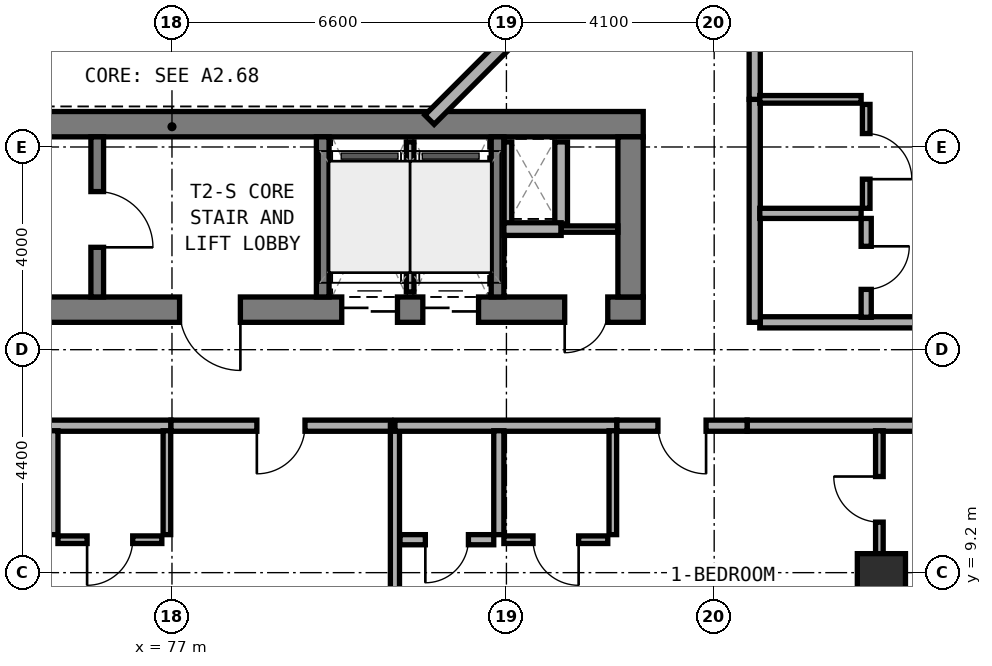
"""IFC4 building model, lengths in metres.
Left out: names, types, materials, properties, quantities, classifications, styles, units other than length and angle.
Written with IfcOpenShell. Run it as: python <this file> out.ifc"""

import sys

from ifc_helpers import new_model, si_unit, direction, frame, frame_2d, origin, origin_2d, place, context, subcontext, project, spatial, rectangle, extrude, element, fill, save


model = new_model("IFC4")
c1 = context("Model", 3, precision=1e-05, world=origin(), true_north=direction((0.0, 1.0)))
c2 = subcontext(c1, "Body", "Model", "MODEL_VIEW")
j1 = project(units=[si_unit("LENGTHUNIT", "METRE"), si_unit("PLANEANGLEUNIT", "RADIAN")], contexts=[c1])
p1 = place(None, origin())
s1 = spatial("IfcSite", under=j1, at=p1, CompositionType="ELEMENT")
p2 = place(p1, origin())
s2 = spatial("IfcBuilding", under=s1, at=p2, CompositionType="ELEMENT")
p3 = place(p2, frame((0.0, 0.0, 59.0)))
s3 = spatial("IfcBuildingStorey", under=s2, at=p3, CompositionType="ELEMENT", Elevation=59.0)
p4 = place(p3, frame((67.9, 14.39, 0.0), z_axis=(0.0, 0.0, 1.0), x_axis=(1.0, 0.0, 0.0)))
e1 = element("IfcWall", 1, at=p4, inside=s3, PredefinedType="SHEAR", context=c2, shape_type="SweptSolid", body=[
    extrude(rectangle(XDim=18.4, YDim=0.5, at=frame_2d((9.2, 0.0))), origin(), (0.0, 0.0, 1.0), 3.5),
])
p5 = place(p4, frame((9.25, 0.0, 0.0)))
e2 = element("IfcOpeningElement", 2, at=p5, cuts=e1, PredefinedType="OPENING", context=c2, shape_type="SweptSolid", body=[
    extrude(rectangle(XDim=1.2, YDim=2.15, at=frame_2d((0.6, 1.075))), frame((0.0, 0.26, 0.0), z_axis=(0.0, -1.0, 0.0), x_axis=(1.0, 0.0, 0.0)), (0.0, 0.0, 1.0), 0.52),
])
p6 = place(p4, frame((16.85, 0.0, 0.0)))
e3 = element("IfcOpeningElement", 3, at=p6, cuts=e1, PredefinedType="OPENING", context=c2, shape_type="SweptSolid", body=[
    extrude(rectangle(XDim=0.85, YDim=2.1, at=frame_2d((0.425, 1.05))), frame((0.0, 0.26, 0.0), z_axis=(0.0, -1.0, 0.0), x_axis=(1.0, 0.0, 0.0)), (0.0, 0.0, 1.0), 0.52),
])
p7 = place(p4, frame((12.45, 0.0, 0.0)))
e4 = element("IfcOpeningElement", 4, at=p7, cuts=e1, PredefinedType="OPENING", context=c2, shape_type="SweptSolid", body=[
    extrude(rectangle(XDim=1.1, YDim=2.15, at=frame_2d((0.55, 1.075))), frame((0.0, 0.26, 0.0), z_axis=(0.0, -1.0, 0.0), x_axis=(1.0, 0.0, 0.0)), (0.0, 0.0, 1.0), 0.52),
])
p8 = place(p4, frame((14.05, 0.0, 0.0)))
e5 = element("IfcOpeningElement", 5, at=p8, cuts=e1, PredefinedType="OPENING", context=c2, shape_type="SweptSolid", body=[
    extrude(rectangle(XDim=1.1, YDim=2.15, at=frame_2d((0.55, 1.075))), frame((0.0, 0.26, 0.0), z_axis=(0.0, -1.0, 0.0), x_axis=(1.0, 0.0, 0.0)), (0.0, 0.0, 1.0), 0.52),
])
p9 = place(p3, frame((67.9, 18.05, 0.0), z_axis=(0.0, 0.0, 1.0), x_axis=(1.0, 0.0, 0.0)))
e6 = element("IfcWall", 6, at=p9, inside=s3, PredefinedType="SHEAR", context=c2, shape_type="SweptSolid", body=[
    extrude(rectangle(XDim=18.4, YDim=0.5, at=frame_2d((9.2, 0.0))), origin(), (0.0, 0.0, 1.0), 3.5),
])
p10 = place(p3, frame((86.05, 14.64, 0.0), z_axis=(0.0, 0.0, 1.0), x_axis=(0.0, 1.0, 0.0)))
e7 = element("IfcWall", 7, at=p10, inside=s3, PredefinedType="SHEAR", context=c2, shape_type="SweptSolid", body=[
    extrude(rectangle(XDim=3.16, YDim=0.5, at=frame_2d((1.58, 0.0))), origin(), (0.0, 0.0, 1.0), 3.5),
])
p11 = place(p3, frame((75.525, 14.64, 0.0), z_axis=(0.0, 0.0, 1.0), x_axis=(0.0, 1.0, 0.0)))
e8 = element("IfcWall", 8, at=p11, inside=s3, PredefinedType="STANDARD", context=c2, shape_type="SweptSolid", body=[
    extrude(rectangle(XDim=3.16, YDim=0.25, at=frame_2d((1.58, 0.0))), origin(), (0.0, 0.0, 1.0), 3.25),
])
p12 = place(p11, frame((0.98, 0.0, 0.0)))
e9 = element("IfcOpeningElement", 9, at=p12, cuts=e8, PredefinedType="OPENING", context=c2, shape_type="SweptSolid", body=[
    extrude(rectangle(XDim=1.1, YDim=2.15, at=frame_2d((0.55, 1.075))), frame((0.0, 0.135, 0.0), z_axis=(0.0, -1.0, 0.0), x_axis=(1.0, 0.0, 0.0)), (0.0, 0.0, 1.0), 0.27),
])
for number, where, z_axis, x_axis in (
    (10, (79.975, 14.64, 0.0), (0.0, 0.0, 1.0), (0.0, 1.0, 0.0)),
    (11, (83.425, 14.64, 0.0), (0.0, 0.0, 1.0), (0.0, 1.0, 0.0)),
):
    element("IfcWall", number, at=place(p3, frame(where, z_axis=z_axis, x_axis=x_axis)), inside=s3, PredefinedType="STANDARD", context=c2, shape_type="SweptSolid", body=[
        extrude(rectangle(XDim=3.16, YDim=0.25, at=frame_2d((1.58, 0.0))), origin(), (0.0, 0.0, 1.0), 3.25),
    ])
p13 = place(p3, frame((91.0, 9.0, 0.0), z_axis=(0.0, 0.0, 1.0), x_axis=(1.0, 0.0, 0.0)))
e12 = element("IfcColumn", 12, at=p13, inside=s3, PredefinedType="COLUMN", context=c2, shape_type="SweptSolid", body=[
    extrude(rectangle(XDim=0.95, YDim=1.15, at=origin_2d()), origin(), (0.0, 0.0, 1.0), 3.5),
])
p14 = place(p3, frame((82.082, 18.138, 0.0), z_axis=(0.0, 0.0, 1.0), x_axis=(0.707106781187, 0.707106781187, 0.0)))
e13 = element("IfcWall", 13, at=p14, inside=s3, PredefinedType="STANDARD", context=c2, shape_type="SweptSolid", body=[
    extrude(rectangle(XDim=2.311, YDim=0.26, at=frame_2d((1.155, 0.0))), origin(), (0.0, 0.0, 1.0), 3.25),
])
p15 = place(p3, frame((83.63, 16.08, 0.0), z_axis=(0.0, 0.0, 1.0), x_axis=(0.0, 1.0, 0.0)))
e14 = element("IfcWall", 14, at=p15, inside=s3, PredefinedType="PARTITIONING", context=c2, shape_type="SweptSolid", body=[
    extrude(rectangle(XDim=1.62, YDim=0.15, at=frame_2d((0.81, 0.0))), origin(), (0.0, 0.0, 1.0), 2.725),
])
p16 = place(p3, frame((84.68, 16.08, 0.0), z_axis=(0.0, 0.0, 1.0), x_axis=(0.0, 1.0, 0.0)))
e15 = element("IfcWall", 15, at=p16, inside=s3, PredefinedType="SOLIDWALL", context=c2, shape_type="SweptSolid", body=[
    extrude(rectangle(XDim=1.62, YDim=0.25, at=frame_2d((0.81, 0.0))), origin(), (0.0, 0.0, 1.0), 3.22),
])
p17 = place(p3, frame((83.55, 15.98, 0.0), z_axis=(0.0, 0.0, 1.0), x_axis=(1.0, 0.0, 0.0)))
e16 = element("IfcWall", 16, at=p17, inside=s3, PredefinedType="SOLIDWALL", context=c2, shape_type="SweptSolid", body=[
    extrude(rectangle(XDim=1.13, YDim=0.25, at=frame_2d((0.565, 0.0))), origin(), (0.0, 0.0, 1.0), 3.22),
])
p18 = place(p3, frame((84.68, 15.98, 0.0), z_axis=(0.0, 0.0, 1.0), x_axis=(1.0, 0.0, 0.0)))
e17 = element("IfcWall", 17, at=p18, inside=s3, PredefinedType="PARTITIONING", context=c2, shape_type="SweptSolid", body=[
    extrude(rectangle(XDim=1.12, YDim=0.125, at=frame_2d((0.56, 0.0))), origin(), (0.0, 0.0, 1.0), 3.22),
])
p19 = place(p3, frame((81.7, 14.74, 0.0), z_axis=(0.0, 0.0, 1.0), x_axis=(0.0, 1.0, 0.0)))
e18 = element("IfcWall", 18, at=p19, inside=s3, PredefinedType="PARTITIONING", context=c2, shape_type="SweptSolid", body=[
    extrude(rectangle(XDim=2.96, YDim=0.15, at=frame_2d((1.48, 0.0))), origin(), (0.0, 0.0, 1.0), 3.22),
])
p20 = place(p3, frame((72.6, 12.1, 0.0), z_axis=(0.0, 0.0, 1.0), x_axis=(1.0, 0.0, 0.0)))
e19 = element("IfcWall", 19, at=p20, inside=s3, PredefinedType="SOLIDWALL", context=c2, shape_type="SweptSolid", body=[
    extrude(rectangle(XDim=4.38, YDim=0.22, at=frame_2d((2.19, 0.0))), origin(), (0.0, 0.0, 1.0), 2.725),
])
p21 = place(p3, frame((76.98, 12.1, 0.0), z_axis=(0.0, 0.0, 1.0), x_axis=(1.0, 0.0, 0.0)))
e20 = element("IfcWall", 20, at=p21, inside=s3, PredefinedType="SOLIDWALL", context=c2, shape_type="SweptSolid", body=[
    extrude(rectangle(XDim=4.34, YDim=0.22, at=frame_2d((2.17, 0.0))), origin(), (0.0, 0.0, 1.0), 2.725),
])
p22 = place(p21, frame((1.695, 0.0, 0.0)))
e21 = element("IfcOpeningElement", 21, at=p22, cuts=e20, PredefinedType="OPENING", context=c2, shape_type="SweptSolid", body=[
    extrude(rectangle(XDim=0.95, YDim=2.1, at=frame_2d((0.475, 1.05))), frame((0.0, 0.12, 0.0), z_axis=(0.0, -1.0, 0.0), x_axis=(1.0, 0.0, 0.0)), (0.0, 0.0, 1.0), 0.24),
])
p23 = place(p3, frame((74.65, 9.95, 0.0), z_axis=(0.0, 0.0, 1.0), x_axis=(0.0, 1.0, 0.0)))
e22 = element("IfcWall", 22, at=p23, inside=s3, PredefinedType="PLUMBINGWALL", context=c2, shape_type="SweptSolid", body=[
    extrude(rectangle(XDim=2.05, YDim=0.2, at=frame_2d((1.025, 0.0))), origin(), (0.0, 0.0, 1.0), 2.865),
])
p24 = place(p3, frame((76.9, 9.95, 0.0), z_axis=(0.0, 0.0, 1.0), x_axis=(0.0, 1.0, 0.0)))
e23 = element("IfcWall", 23, at=p24, inside=s3, PredefinedType="PARTITIONING", context=c2, shape_type="SweptSolid", body=[
    extrude(rectangle(XDim=2.05, YDim=0.15, at=frame_2d((1.025, 0.0))), origin(), (0.0, 0.0, 1.0), 2.865),
])
p25 = place(p3, frame((74.75, 9.85, 0.0), z_axis=(0.0, 0.0, 1.0), x_axis=(1.0, 0.0, 0.0)))
e24 = element("IfcWall", 24, at=p25, inside=s3, PredefinedType="PARTITIONING", context=c2, shape_type="SweptSolid", body=[
    extrude(rectangle(XDim=2.05, YDim=0.15, at=frame_2d((1.025, 0.0))), origin(), (0.0, 0.0, 1.0), 3.22),
])
p26 = place(p25, frame((0.575, 0.0, 0.0)))
e25 = element("IfcOpeningElement", 25, at=p26, cuts=e24, PredefinedType="OPENING", context=c2, shape_type="SweptSolid", body=[
    extrude(rectangle(XDim=0.9, YDim=2.1, at=frame_2d((0.45, 1.05))), frame((0.0, 0.085, 0.0), z_axis=(0.0, -1.0, 0.0), x_axis=(1.0, 0.0, 0.0)), (0.0, 0.0, 1.0), 0.17),
])
p27 = place(p3, frame((81.4, 5.06, 0.0), z_axis=(0.0, 0.0, 1.0), x_axis=(0.0, 1.0, 0.0)))
e26 = element("IfcWall", 26, at=p27, inside=s3, PredefinedType="SOLIDWALL", context=c2, shape_type="SweptSolid", body=[
    extrude(rectangle(XDim=7.04, YDim=0.18, at=frame_2d((3.52, 0.0))), origin(), (0.0, 0.0, 1.0), 2.725),
])
p28 = place(p3, frame((81.4, 12.1, 0.0), z_axis=(0.0, 0.0, 1.0), x_axis=(1.0, 0.0, 0.0)))
e27 = element("IfcWall", 27, at=p28, inside=s3, PredefinedType="SOLIDWALL", context=c2, shape_type="SweptSolid", body=[
    extrude(rectangle(XDim=4.38, YDim=0.22, at=frame_2d((2.19, 0.0))), origin(), (0.0, 0.0, 1.0), 2.725),
])
p29 = place(p3, frame((88.35, 12.1, 0.0), z_axis=(0.0, 0.0, 1.0), x_axis=(1.0, 0.0, 0.0)))
e28 = element("IfcWall", 28, at=p29, inside=s3, PredefinedType="SOLIDWALL", context=c2, shape_type="SweptSolid", body=[
    extrude(rectangle(XDim=7.41, YDim=0.22, at=frame_2d((3.705, 0.0))), origin(), (0.0, 0.0, 1.0), 2.865),
])
p30 = place(p3, frame((85.78, 12.1, 0.0), z_axis=(0.0, 0.0, 1.0), x_axis=(1.0, 0.0, 0.0)))
e29 = element("IfcWall", 29, at=p30, inside=s3, PredefinedType="SOLIDWALL", context=c2, shape_type="SweptSolid", body=[
    extrude(rectangle(XDim=2.57, YDim=0.22, at=frame_2d((1.285, 0.0))), origin(), (0.0, 0.0, 1.0), 3.22),
])
p31 = place(p30, frame((0.81, 0.0, 0.0)))
e30 = element("IfcOpeningElement", 30, at=p31, cuts=e29, PredefinedType="OPENING", context=c2, shape_type="SweptSolid", body=[
    extrude(rectangle(XDim=0.95, YDim=2.1, at=frame_2d((0.475, 1.05))), frame((0.0, 0.12, 0.0), z_axis=(0.0, -1.0, 0.0), x_axis=(1.0, 0.0, 0.0)), (0.0, 0.0, 1.0), 0.24),
])
p32 = place(p3, frame((90.96, 6.887, 0.0), z_axis=(0.0, 0.0, 1.0), x_axis=(0.0, 1.0, 0.0)))
e31 = element("IfcWall", 31, at=p32, inside=s3, PredefinedType="PARTITIONING", context=c2, shape_type="SweptSolid", body=[
    extrude(rectangle(XDim=5.113, YDim=0.15, at=frame_2d((2.557, 0.0))), origin(), (0.0, 0.0, 1.0), 2.865),
])
p33 = place(p32, frame((3.31, 0.0, 0.0)))
e32 = element("IfcOpeningElement", 32, at=p33, cuts=e31, PredefinedType="OPENING", context=c2, shape_type="SweptSolid", body=[
    extrude(rectangle(XDim=0.9, YDim=2.1, at=frame_2d((0.45, 1.05))), frame((0.0, 0.085, 0.0), z_axis=(0.0, -1.0, 0.0), x_axis=(1.0, 0.0, 0.0)), (0.0, 0.0, 1.0), 0.17),
])
p34 = place(p3, frame((83.45, 9.95, 0.0), z_axis=(0.0, 0.0, 1.0), x_axis=(0.0, 1.0, 0.0)))
e33 = element("IfcWall", 33, at=p34, inside=s3, PredefinedType="PLUMBINGWALL", context=c2, shape_type="SweptSolid", body=[
    extrude(rectangle(XDim=2.05, YDim=0.2, at=frame_2d((1.025, 0.0))), origin(), (0.0, 0.0, 1.0), 3.22),
])
p35 = place(p3, frame((85.7, 9.95, 0.0), z_axis=(0.0, 0.0, 1.0), x_axis=(0.0, 1.0, 0.0)))
e34 = element("IfcWall", 34, at=p35, inside=s3, PredefinedType="PARTITIONING", context=c2, shape_type="SweptSolid", body=[
    extrude(rectangle(XDim=2.05, YDim=0.15, at=frame_2d((1.025, 0.0))), origin(), (0.0, 0.0, 1.0), 3.22),
])
p36 = place(p3, frame((81.5, 9.85, 0.0), z_axis=(0.0, 0.0, 1.0), x_axis=(1.0, 0.0, 0.0)))
e35 = element("IfcWall", 35, at=p36, inside=s3, PredefinedType="PLUMBINGWALL", context=c2, shape_type="SweptSolid", body=[
    extrude(rectangle(XDim=1.85, YDim=0.2, at=frame_2d((0.925, 0.0))), origin(), (0.0, 0.0, 1.0), 2.725),
])
p37 = place(p36, frame((0.5, 0.0, 0.0)))
e36 = element("IfcOpeningElement", 36, at=p37, cuts=e35, PredefinedType="OPENING", context=c2, shape_type="SweptSolid", body=[
    extrude(rectangle(XDim=0.85, YDim=2.1, at=frame_2d((0.425, 1.05))), frame((0.0, 0.11, 0.0), z_axis=(0.0, -1.0, 0.0), x_axis=(1.0, 0.0, 0.0)), (0.0, 0.0, 1.0), 0.22),
])
p38 = place(p3, frame((83.55, 9.85, 0.0), z_axis=(0.0, 0.0, 1.0), x_axis=(1.0, 0.0, 0.0)))
e37 = element("IfcWall", 37, at=p38, inside=s3, PredefinedType="PARTITIONING", context=c2, shape_type="SweptSolid", body=[
    extrude(rectangle(XDim=2.05, YDim=0.15, at=frame_2d((1.025, 0.0))), origin(), (0.0, 0.0, 1.0), 3.22),
])
p39 = place(p38, frame((0.575, 0.0, 0.0)))
e38 = element("IfcOpeningElement", 38, at=p39, cuts=e37, PredefinedType="OPENING", context=c2, shape_type="SweptSolid", body=[
    extrude(rectangle(XDim=0.9, YDim=2.1, at=frame_2d((0.45, 1.05))), frame((0.0, 0.085, 0.0), z_axis=(0.0, -1.0, 0.0), x_axis=(1.0, 0.0, 0.0)), (0.0, 0.0, 1.0), 0.17),
])
p40 = place(p3, frame((88.6, 14.14, 0.0), z_axis=(0.0, 0.0, 1.0), x_axis=(1.0, 0.0, 0.0)))
e39 = element("IfcWall", 39, at=p40, inside=s3, PredefinedType="SOLIDWALL", context=c2, shape_type="SweptSolid", body=[
    extrude(rectangle(XDim=7.0, YDim=0.22, at=frame_2d((3.5, 0.0))), origin(), (0.0, 0.0, 1.0), 2.865),
])
p41 = place(p3, frame((88.5, 14.14, 0.0), z_axis=(0.0, 0.0, 1.0), x_axis=(0.0, 1.0, 0.0)))
e40 = element("IfcWall", 40, at=p41, inside=s3, PredefinedType="SOLIDWALL", context=c2, shape_type="SweptSolid", body=[
    extrude(rectangle(XDim=4.4, YDim=0.22, at=frame_2d((2.2, 0.0))), origin(), (0.0, 0.0, 1.0), 3.22),
])
p42 = place(p3, frame((88.5, 18.54, 0.0), z_axis=(0.0, 0.0, 1.0), x_axis=(0.0, 1.0, 0.0)))
e41 = element("IfcWall", 41, at=p42, inside=s3, PredefinedType="SOLIDWALL", context=c2, shape_type="SweptSolid", body=[
    extrude(rectangle(XDim=3.46, YDim=0.22, at=frame_2d((1.73, 0.0))), origin(), (0.0, 0.0, 1.0), 2.725),
])
p43 = place(p42, frame((1.255, 0.0, 0.0)))
e42 = element("IfcOpeningElement", 42, at=p43, cuts=e41, PredefinedType="OPENING", context=c2, shape_type="SweptSolid", body=[
    extrude(rectangle(XDim=0.95, YDim=2.1, at=frame_2d((0.475, 1.05))), frame((0.0, 0.12, 0.0), z_axis=(0.0, -1.0, 0.0), x_axis=(1.0, 0.0, 0.0)), (0.0, 0.0, 1.0), 0.24),
])
p44 = place(p3, frame((88.6, 16.29, 0.0), z_axis=(0.0, 0.0, 1.0), x_axis=(1.0, 0.0, 0.0)))
e43 = element("IfcWall", 43, at=p44, inside=s3, PredefinedType="PLUMBINGWALL", context=c2, shape_type="SweptSolid", body=[
    extrude(rectangle(XDim=2.0, YDim=0.2, at=frame_2d((1.0, 0.0))), origin(), (0.0, 0.0, 1.0), 3.22),
])
p45 = place(p3, frame((88.6, 18.54, 0.0), z_axis=(0.0, 0.0, 1.0), x_axis=(1.0, 0.0, 0.0)))
e44 = element("IfcWall", 44, at=p45, inside=s3, PredefinedType="PARTITIONING", context=c2, shape_type="SweptSolid", body=[
    extrude(rectangle(XDim=2.0, YDim=0.15, at=frame_2d((1.0, 0.0))), origin(), (0.0, 0.0, 1.0), 3.22),
])
p46 = place(p3, frame((90.7, 14.24, 0.0), z_axis=(0.0, 0.0, 1.0), x_axis=(0.0, 1.0, 0.0)))
e45 = element("IfcWall", 45, at=p46, inside=s3, PredefinedType="PLUMBINGWALL", context=c2, shape_type="SweptSolid", body=[
    extrude(rectangle(XDim=1.95, YDim=0.2, at=frame_2d((0.975, 0.0))), origin(), (0.0, 0.0, 1.0), 3.22),
])
p47 = place(p46, frame((0.55, 0.0, 0.0)))
e46 = element("IfcOpeningElement", 46, at=p47, cuts=e45, PredefinedType="OPENING", context=c2, shape_type="SweptSolid", body=[
    extrude(rectangle(XDim=0.85, YDim=2.1, at=frame_2d((0.425, 1.05))), frame((0.0, 0.11, 0.0), z_axis=(0.0, -1.0, 0.0), x_axis=(1.0, 0.0, 0.0)), (0.0, 0.0, 1.0), 0.22),
])
p48 = place(p3, frame((90.7, 16.39, 0.0), z_axis=(0.0, 0.0, 1.0), x_axis=(0.0, 1.0, 0.0)))
e47 = element("IfcWall", 47, at=p48, inside=s3, PredefinedType="PARTITIONING", context=c2, shape_type="SweptSolid", body=[
    extrude(rectangle(XDim=2.05, YDim=0.15, at=frame_2d((1.025, 0.0))), origin(), (0.0, 0.0, 1.0), 3.22),
])
p49 = place(p48, frame((0.575, 0.0, 0.0)))
e48 = element("IfcOpeningElement", 48, at=p49, cuts=e47, PredefinedType="OPENING", context=c2, shape_type="SweptSolid", body=[
    extrude(rectangle(XDim=0.9, YDim=2.1, at=frame_2d((0.45, 1.05))), frame((0.0, 0.085, 0.0), z_axis=(0.0, -1.0, 0.0), x_axis=(1.0, 0.0, 0.0)), (0.0, 0.0, 1.0), 0.17),
])
p50 = place(p12, frame((1.1, 0.0, 0.0), z_axis=(0.0, 0.0, 1.0), x_axis=(-1.0, 0.0, 0.0)))
e49 = element("IfcDoor", 49, at=p50, inside=s3, OperationType="SINGLE_SWING_RIGHT", PredefinedType="DOOR", context=c2, shape_type="SweptSolid", body=[
    extrude(rectangle(XDim=1.1, YDim=2.15, at=frame_2d((0.55, 1.075))), frame((0.0, 0.025, 0.0), z_axis=(0.0, -1.0, 0.0), x_axis=(1.0, 0.0, 0.0)), (0.0, 0.0, 1.0), 0.05),
])
fill(e9, e49)
p51 = place(p5, frame((1.2, 0.0, 0.0), z_axis=(0.0, 0.0, 1.0), x_axis=(-1.0, 0.0, 0.0)))
e50 = element("IfcDoor", 50, at=p51, inside=s3, OperationType="SINGLE_SWING_LEFT", PredefinedType="DOOR", context=c2, shape_type="SweptSolid", body=[
    extrude(rectangle(XDim=1.2, YDim=2.15, at=frame_2d((0.6, 1.075))), frame((0.0, 0.025, 0.0), z_axis=(0.0, -1.0, 0.0), x_axis=(1.0, 0.0, 0.0)), (0.0, 0.0, 1.0), 0.05),
])
fill(e2, e50)
p52 = place(p6, frame((0.85, 0.0, 0.0), z_axis=(0.0, 0.0, 1.0), x_axis=(-1.0, 0.0, 0.0)))
e51 = element("IfcDoor", 51, at=p52, inside=s3, OperationType="SINGLE_SWING_RIGHT", PredefinedType="DOOR", context=c2, shape_type="SweptSolid", body=[
    extrude(rectangle(XDim=0.85, YDim=2.1, at=frame_2d((0.425, 1.05))), frame((0.0, 0.025, 0.0), z_axis=(0.0, -1.0, 0.0), x_axis=(1.0, 0.0, 0.0)), (0.0, 0.0, 1.0), 0.05),
])
fill(e3, e51)
p53 = place(p7, frame((1.1, 0.0, 0.0), z_axis=(0.0, 0.0, 1.0), x_axis=(-1.0, 0.0, 0.0)))
e52 = element("IfcDoor", 52, at=p53, inside=s3, OperationType="DOUBLE_DOOR_SLIDING", PredefinedType="DOOR", context=c2, shape_type="SweptSolid", body=[
    extrude(rectangle(XDim=1.1, YDim=2.15, at=frame_2d((0.55, 1.075))), frame((0.0, 0.025, 0.0), z_axis=(0.0, -1.0, 0.0), x_axis=(1.0, 0.0, 0.0)), (0.0, 0.0, 1.0), 0.05),
])
fill(e4, e52)
p54 = place(p8, frame((1.1, 0.0, 0.0), z_axis=(0.0, 0.0, 1.0), x_axis=(-1.0, 0.0, 0.0)))
e53 = element("IfcDoor", 53, at=p54, inside=s3, OperationType="DOUBLE_DOOR_SLIDING", PredefinedType="DOOR", context=c2, shape_type="SweptSolid", body=[
    extrude(rectangle(XDim=1.1, YDim=2.15, at=frame_2d((0.55, 1.075))), frame((0.0, 0.025, 0.0), z_axis=(0.0, -1.0, 0.0), x_axis=(1.0, 0.0, 0.0)), (0.0, 0.0, 1.0), 0.05),
])
fill(e5, e53)
p55 = place(p22, frame((0.95, 0.0, 0.0), z_axis=(0.0, 0.0, 1.0), x_axis=(-1.0, 0.0, 0.0)))
e54 = element("IfcDoor", 54, at=p55, inside=s3, OperationType="SINGLE_SWING_RIGHT", PredefinedType="DOOR", context=c2, shape_type="SweptSolid", body=[
    extrude(rectangle(XDim=0.95, YDim=2.1, at=frame_2d((0.475, 1.05))), frame((0.0, 0.025, 0.0), z_axis=(0.0, -1.0, 0.0), x_axis=(1.0, 0.0, 0.0)), (0.0, 0.0, 1.0), 0.05),
])
fill(e21, e54)
p56 = place(p26, frame((0.9, 0.0, 0.0), z_axis=(0.0, 0.0, 1.0), x_axis=(-1.0, 0.0, 0.0)))
e55 = element("IfcDoor", 55, at=p56, inside=s3, OperationType="SINGLE_SWING_RIGHT", PredefinedType="DOOR", context=c2, shape_type="SweptSolid", body=[
    extrude(rectangle(XDim=0.9, YDim=2.1, at=frame_2d((0.45, 1.05))), frame((0.0, 0.025, 0.0), z_axis=(0.0, -1.0, 0.0), x_axis=(1.0, 0.0, 0.0)), (0.0, 0.0, 1.0), 0.05),
])
fill(e25, e55)
p57 = place(p31, frame((0.95, 0.0, 0.0), z_axis=(0.0, 0.0, 1.0), x_axis=(-1.0, 0.0, 0.0)))
e56 = element("IfcDoor", 56, at=p57, inside=s3, OperationType="SINGLE_SWING_LEFT", PredefinedType="DOOR", context=c2, shape_type="SweptSolid", body=[
    extrude(rectangle(XDim=0.95, YDim=2.1, at=frame_2d((0.475, 1.05))), frame((0.0, 0.025, 0.0), z_axis=(0.0, -1.0, 0.0), x_axis=(1.0, 0.0, 0.0)), (0.0, 0.0, 1.0), 0.05),
])
fill(e30, e56)
p58 = place(p33, origin())
e57 = element("IfcDoor", 57, at=p58, inside=s3, OperationType="SINGLE_SWING_RIGHT", PredefinedType="DOOR", context=c2, shape_type="SweptSolid", body=[
    extrude(rectangle(XDim=0.9, YDim=2.1, at=frame_2d((0.45, 1.05))), frame((0.0, 0.025, 0.0), z_axis=(0.0, -1.0, 0.0), x_axis=(1.0, 0.0, 0.0)), (0.0, 0.0, 1.0), 0.05),
])
fill(e32, e57)
p59 = place(p37, frame((0.85, 0.0, 0.0), z_axis=(0.0, 0.0, 1.0), x_axis=(-1.0, 0.0, 0.0)))
e58 = element("IfcDoor", 58, at=p59, inside=s3, OperationType="SINGLE_SWING_RIGHT", PredefinedType="DOOR", context=c2, shape_type="SweptSolid", body=[
    extrude(rectangle(XDim=0.85, YDim=2.1, at=frame_2d((0.425, 1.05))), frame((0.0, 0.025, 0.0), z_axis=(0.0, -1.0, 0.0), x_axis=(1.0, 0.0, 0.0)), (0.0, 0.0, 1.0), 0.05),
])
fill(e36, e58)
p60 = place(p39, frame((0.9, 0.0, 0.0), z_axis=(0.0, 0.0, 1.0), x_axis=(-1.0, 0.0, 0.0)))
e59 = element("IfcDoor", 59, at=p60, inside=s3, OperationType="SINGLE_SWING_LEFT", PredefinedType="DOOR", context=c2, shape_type="SweptSolid", body=[
    extrude(rectangle(XDim=0.9, YDim=2.1, at=frame_2d((0.45, 1.05))), frame((0.0, 0.025, 0.0), z_axis=(0.0, -1.0, 0.0), x_axis=(1.0, 0.0, 0.0)), (0.0, 0.0, 1.0), 0.05),
])
fill(e38, e59)
p61 = place(p47, frame((0.85, 0.0, 0.0), z_axis=(0.0, 0.0, 1.0), x_axis=(-1.0, 0.0, 0.0)))
e60 = element("IfcDoor", 60, at=p61, inside=s3, OperationType="SINGLE_SWING_LEFT", PredefinedType="DOOR", context=c2, shape_type="SweptSolid", body=[
    extrude(rectangle(XDim=0.85, YDim=2.1, at=frame_2d((0.425, 1.05))), frame((0.0, 0.025, 0.0), z_axis=(0.0, -1.0, 0.0), x_axis=(1.0, 0.0, 0.0)), (0.0, 0.0, 1.0), 0.05),
])
fill(e46, e60)
p62 = place(p49, frame((0.9, 0.0, 0.0), z_axis=(0.0, 0.0, 1.0), x_axis=(-1.0, 0.0, 0.0)))
e61 = element("IfcDoor", 61, at=p62, inside=s3, OperationType="SINGLE_SWING_RIGHT", PredefinedType="DOOR", context=c2, shape_type="SweptSolid", body=[
    extrude(rectangle(XDim=0.9, YDim=2.1, at=frame_2d((0.45, 1.05))), frame((0.0, 0.025, 0.0), z_axis=(0.0, -1.0, 0.0), x_axis=(1.0, 0.0, 0.0)), (0.0, 0.0, 1.0), 0.05),
])
fill(e48, e61)
save(model, sys.argv[1])
